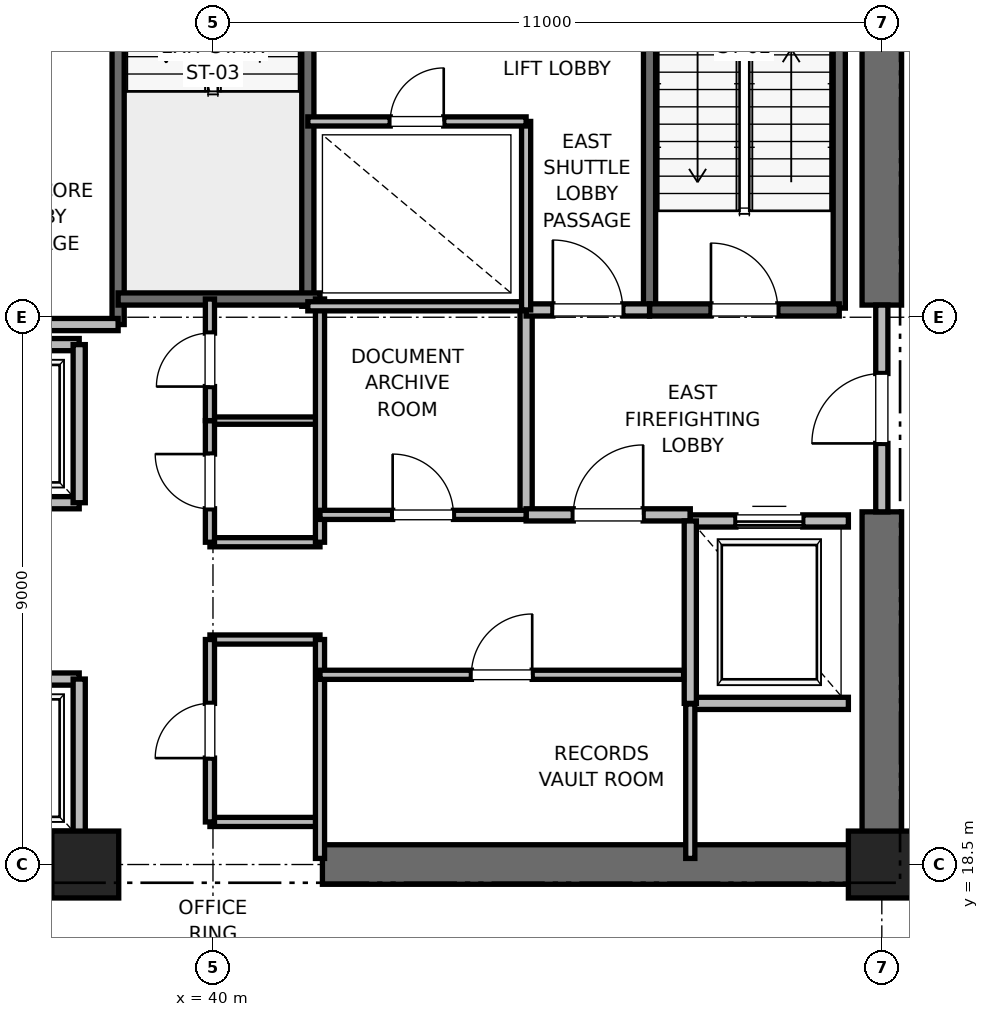
"""IFC4 building model, lengths in metres.
Left out: names, types, materials, properties, quantities, classifications, styles, units other than length and angle.
Written with IfcOpenShell. Run it as: python <this file> out.ifc"""

import sys

from ifc_helpers import new_model, si_unit, direction, frame, frame_2d, origin, origin_2d, place, context, subcontext, project, spatial, rectangle, extrude, element, fill, save


model = new_model("IFC4")
c1 = context("Model", 3, precision=1e-05, world=origin(), true_north=direction((0.0, 1.0)))
c2 = subcontext(c1, "Body", "Model", "MODEL_VIEW")
j1 = project(units=[si_unit("LENGTHUNIT", "METRE"), si_unit("PLANEANGLEUNIT", "RADIAN")], contexts=[c1])
p1 = place(None, origin())
s1 = spatial("IfcSite", under=j1, at=p1, CompositionType="ELEMENT")
p2 = place(p1, origin())
s2 = spatial("IfcBuilding", under=s1, at=p2, CompositionType="ELEMENT")
p3 = place(p2, frame((0.0, 0.0, 55.6)))
s3 = spatial("IfcBuildingStorey", under=s2, at=p3, CompositionType="ELEMENT", Elevation=55.6)
for number, where, z_axis, x_axis in (
    (1, (51.0, 18.5, 0.0), (0.0, 0.0, 1.0), (1.0, 0.0, 0.0)),
    (2, (37.9, 18.5, 0.0), (0.0, 0.0, 1.0), (1.0, 0.0, 0.0)),
):
    element("IfcColumn", number, at=place(p3, frame(where, z_axis=z_axis, x_axis=x_axis)), inside=s3, PredefinedType="PILASTER", context=c2, shape_type="SweptSolid", body=[
        extrude(rectangle(XDim=1.1, YDim=1.1, at=origin_2d()), origin(), (0.0, 0.0, 1.0), 4.0),
    ])
for number, where, z_axis, x_axis in (
    (3, (29.0, 18.5, 0.0), (0.0, 0.0, 1.0), (1.0, 0.0, 0.0)),
    (4, (41.8, 18.5, 0.0), (0.0, 0.0, 1.0), (1.0, 0.0, 0.0)),
):
    element("IfcWall", number, at=place(p3, frame(where, z_axis=z_axis, x_axis=x_axis)), inside=s3, PredefinedType="SHEAR", context=c2, shape_type="SweptSolid", body=[
        extrude(rectangle(XDim=9.2, YDim=0.65, at=frame_2d((4.6, 0.0))), origin(), (0.0, 0.0, 1.0), 3.76),
    ])
p4 = place(p3, frame((51.0, 18.5, 0.0), z_axis=(0.0, 0.0, 1.0), x_axis=(0.0, 1.0, 0.0)))
e5 = element("IfcWall", 5, at=p4, inside=s3, PredefinedType="SHEAR", context=c2, shape_type="SweptSolid", body=[
    extrude(rectangle(XDim=5.8, YDim=0.65, at=frame_2d((2.9, 0.0))), origin(), (0.0, 0.0, 1.0), 3.76),
])
p5 = place(p3, frame((51.0, 27.7, 0.0), z_axis=(0.0, 0.0, 1.0), x_axis=(0.0, 1.0, 0.0)))
e6 = element("IfcWall", 6, at=p5, inside=s3, PredefinedType="SHEAR", context=c2, shape_type="SweptSolid", body=[
    extrude(rectangle(XDim=8.8, YDim=0.65, at=frame_2d((4.4, 0.0))), origin(), (0.0, 0.0, 1.0), 3.76),
])
p6 = place(p3, frame((50.3, 27.65, 0.0), z_axis=(0.0, 0.0, 1.0), x_axis=(0.0, 1.0, 0.0)))
e7 = element("IfcWall", 7, at=p6, inside=s3, PredefinedType="SOLIDWALL", context=c2, shape_type="SweptSolid", body=[
    extrude(rectangle(XDim=8.15, YDim=0.2, at=frame_2d((4.075, 0.0))), origin(), (0.0, 0.0, 1.0), 3.76),
])
p7 = place(p3, frame((47.18, 27.62, 0.0), z_axis=(0.0, 0.0, 1.0), x_axis=(0.0, 1.0, 0.0)))
e8 = element("IfcWall", 8, at=p7, inside=s3, PredefinedType="SOLIDWALL", context=c2, shape_type="SweptSolid", body=[
    extrude(rectangle(XDim=8.18, YDim=0.2, at=frame_2d((4.09, 0.0))), origin(), (0.0, 0.0, 1.0), 3.76),
])
p8 = place(p3, frame((47.18, 27.62, 0.0), z_axis=(0.0, 0.0, 1.0), x_axis=(1.0, 0.0, 0.0)))
e9 = element("IfcWall", 9, at=p8, inside=s3, PredefinedType="SOLIDWALL", context=c2, shape_type="SweptSolid", body=[
    extrude(rectangle(XDim=3.12, YDim=0.2, at=frame_2d((1.56, 0.0))), origin(), (0.0, 0.0, 1.0), 3.76),
])
p9 = place(p8, frame((1.01, 0.0, 0.0)))
e10 = element("IfcOpeningElement", 10, at=p9, cuts=e9, PredefinedType="OPENING", context=c2, shape_type="SweptSolid", body=[
    extrude(rectangle(XDim=1.1, YDim=2.15, at=frame_2d((0.55, 1.075))), frame((0.0, 0.1, 0.0), z_axis=(0.0, -1.0, 0.0), x_axis=(1.0, 0.0, 0.0)), (0.0, 0.0, 1.0), 0.2),
])
p10 = place(p3, frame((38.44, 27.38, 0.0), z_axis=(0.0, 0.0, 1.0), x_axis=(0.0, 1.0, 0.0)))
e11 = element("IfcWall", 11, at=p10, inside=s3, PredefinedType="SOLIDWALL", context=c2, shape_type="SweptSolid", body=[
    extrude(rectangle(XDim=8.87, YDim=0.2, at=frame_2d((4.435, 0.0))), origin(), (0.0, 0.0, 1.0), 3.76),
])
p11 = place(p3, frame((41.56, 27.68, 0.0), z_axis=(0.0, 0.0, 1.0), x_axis=(0.0, 1.0, 0.0)))
e12 = element("IfcWall", 12, at=p11, inside=s3, PredefinedType="SOLIDWALL", context=c2, shape_type="SweptSolid", body=[
    extrude(rectangle(XDim=8.57, YDim=0.2, at=frame_2d((4.285, 0.0))), origin(), (0.0, 0.0, 1.0), 3.76),
])
p12 = place(p3, frame((38.44, 27.8, 0.0), z_axis=(0.0, 0.0, 1.0), x_axis=(1.0, 0.0, 0.0)))
e13 = element("IfcWall", 13, at=p12, inside=s3, PredefinedType="SOLIDWALL", context=c2, shape_type="SweptSolid", body=[
    extrude(rectangle(XDim=3.32, YDim=0.2, at=frame_2d((1.66, 0.0))), origin(), (0.0, 0.0, 1.0), 3.76),
])
p13 = place(p3, frame((32.82, 27.38, 0.0), z_axis=(0.0, 0.0, 1.0), x_axis=(1.0, 0.0, 0.0)))
e14 = element("IfcWall", 14, at=p13, inside=s3, PredefinedType="PARTITIONING", context=c2, shape_type="SweptSolid", body=[
    extrude(rectangle(XDim=5.62, YDim=0.2, at=frame_2d((2.81, 0.0))), origin(), (0.0, 0.0, 1.0), 3.76),
])
p14 = place(p3, frame((45.15, 24.25, 0.0), z_axis=(0.0, 0.0, 1.0), x_axis=(0.0, 1.0, 0.0)))
e15 = element("IfcWall", 15, at=p14, inside=s3, PredefinedType="PARTITIONING", context=c2, shape_type="SweptSolid", body=[
    extrude(rectangle(XDim=3.37, YDim=0.2, at=frame_2d((1.685, 0.0))), origin(), (0.0, 0.0, 1.0), 3.76),
])
p15 = place(p3, frame((45.15, 24.25, 0.0), z_axis=(0.0, 0.0, 1.0), x_axis=(1.0, 0.0, 0.0)))
e16 = element("IfcWall", 16, at=p15, inside=s3, PredefinedType="PARTITIONING", context=c2, shape_type="SweptSolid", body=[
    extrude(rectangle(XDim=2.7, YDim=0.2, at=frame_2d((1.35, 0.0))), origin(), (0.0, 0.0, 1.0), 3.76),
])
p16 = place(p15, frame((0.775, 0.0, 0.0)))
e17 = element("IfcOpeningElement", 17, at=p16, cuts=e16, PredefinedType="OPENING", context=c2, shape_type="SweptSolid", body=[
    extrude(rectangle(XDim=1.15, YDim=2.2, at=frame_2d((0.575, 1.1))), frame((0.0, 0.1, 0.0), z_axis=(0.0, -1.0, 0.0), x_axis=(1.0, 0.0, 0.0)), (0.0, 0.0, 1.0), 0.2),
])
p17 = place(p3, frame((45.15, 27.62, 0.0), z_axis=(0.0, 0.0, 1.0), x_axis=(1.0, 0.0, 0.0)))
e18 = element("IfcWall", 18, at=p17, inside=s3, PredefinedType="PARTITIONING", context=c2, shape_type="SweptSolid", body=[
    extrude(rectangle(XDim=2.03, YDim=0.2, at=frame_2d((1.015, 0.0))), origin(), (0.0, 0.0, 1.0), 3.76),
])
p18 = place(p17, frame((0.44, 0.0, 0.0)))
e19 = element("IfcOpeningElement", 19, at=p18, cuts=e18, PredefinedType="OPENING", context=c2, shape_type="SweptSolid", body=[
    extrude(rectangle(XDim=1.15, YDim=2.2, at=frame_2d((0.575, 1.1))), frame((0.0, 0.1, 0.0), z_axis=(0.0, -1.0, 0.0), x_axis=(1.0, 0.0, 0.0)), (0.0, 0.0, 1.0), 0.2),
])
p19 = place(p3, frame((51.0, 24.3, 0.0), z_axis=(0.0, 0.0, 1.0), x_axis=(0.0, 1.0, 0.0)))
e20 = element("IfcWall", 20, at=p19, inside=s3, PredefinedType="PARTITIONING", context=c2, shape_type="SweptSolid", body=[
    extrude(rectangle(XDim=3.4, YDim=0.2, at=frame_2d((1.7, 0.0))), origin(), (0.0, 0.0, 1.0), 2.54),
])
p20 = place(p19, frame((1.125, 0.0, 0.0)))
e21 = element("IfcOpeningElement", 21, at=p20, cuts=e20, PredefinedType="OPENING", context=c2, shape_type="SweptSolid", body=[
    extrude(rectangle(XDim=1.15, YDim=2.2, at=frame_2d((0.575, 1.1))), frame((0.0, 0.1, 0.0), z_axis=(0.0, -1.0, 0.0), x_axis=(1.0, 0.0, 0.0)), (0.0, 0.0, 1.0), 0.2),
])
p21 = place(p3, frame((47.85, 21.15, 0.0), z_axis=(0.0, 0.0, 1.0), x_axis=(1.0, 0.0, 0.0)))
e22 = element("IfcWall", 22, at=p21, inside=s3, PredefinedType="SOLIDWALL", context=c2, shape_type="SweptSolid", body=[
    extrude(rectangle(XDim=2.6, YDim=0.2, at=frame_2d((1.3, 0.0))), origin(), (0.0, 0.0, 1.0), 3.76),
])
p22 = place(p3, frame((50.45, 24.15, 0.0), z_axis=(0.0, 0.0, 1.0), x_axis=(-1.0, 0.0, 0.0)))
e23 = element("IfcWall", 23, at=p22, inside=s3, PredefinedType="SOLIDWALL", context=c2, shape_type="SweptSolid", body=[
    extrude(rectangle(XDim=2.6, YDim=0.2, at=frame_2d((1.3, 0.0))), origin(), (0.0, 0.0, 1.0), 2.54),
])
p23 = place(p22, frame((0.75, 0.0, 0.0)))
e24 = element("IfcOpeningElement", 24, at=p23, cuts=e23, PredefinedType="OPENING", context=c2, shape_type="SweptSolid", body=[
    extrude(rectangle(XDim=1.1, YDim=2.2, at=frame_2d((0.55, 1.1))), frame((0.0, 0.1, 0.0), z_axis=(0.0, -1.0, 0.0), x_axis=(1.0, 0.0, 0.0)), (0.0, 0.0, 1.0), 0.2),
])
p24 = place(p3, frame((47.85, 24.15, 0.0), z_axis=(0.0, 0.0, 1.0), x_axis=(0.0, -1.0, 0.0)))
e25 = element("IfcWall", 25, at=p24, inside=s3, PredefinedType="SOLIDWALL", context=c2, shape_type="SweptSolid", body=[
    extrude(rectangle(XDim=3.0, YDim=0.2, at=frame_2d((1.5, 0.0))), origin(), (0.0, 0.0, 1.0), 3.76),
])
p25 = place(p3, frame((35.5, 18.95, 0.0), z_axis=(0.0, 0.0, 1.0), x_axis=(1.0, 0.0, 0.0)))
e26 = element("IfcWall", 26, at=p25, inside=s3, PredefinedType="SOLIDWALL", context=c2, shape_type="SweptSolid", body=[
    extrude(rectangle(XDim=2.3, YDim=0.2, at=frame_2d((1.15, 0.0))), origin(), (0.0, 0.0, 1.0), 2.54),
])
p26 = place(p3, frame((37.8, 21.55, 0.0), z_axis=(0.0, 0.0, 1.0), x_axis=(-1.0, 0.0, 0.0)))
e27 = element("IfcWall", 27, at=p26, inside=s3, PredefinedType="SOLIDWALL", context=c2, shape_type="SweptSolid", body=[
    extrude(rectangle(XDim=2.3, YDim=0.2, at=frame_2d((1.15, 0.0))), origin(), (0.0, 0.0, 1.0), 3.76),
])
p27 = place(p26, frame((0.6, 0.0, 0.0)))
e28 = element("IfcOpeningElement", 28, at=p27, cuts=e27, PredefinedType="OPENING", context=c2, shape_type="SweptSolid", body=[
    extrude(rectangle(XDim=1.1, YDim=2.2, at=frame_2d((0.55, 1.1))), frame((0.0, 0.1, 0.0), z_axis=(0.0, -1.0, 0.0), x_axis=(1.0, 0.0, 0.0)), (0.0, 0.0, 1.0), 0.2),
])
p28 = place(p3, frame((37.8, 18.95, 0.0), z_axis=(0.0, 0.0, 1.0), x_axis=(0.0, 1.0, 0.0)))
e29 = element("IfcWall", 29, at=p28, inside=s3, PredefinedType="SOLIDWALL", context=c2, shape_type="SweptSolid", body=[
    extrude(rectangle(XDim=2.6, YDim=0.2, at=frame_2d((1.3, 0.0))), origin(), (0.0, 0.0, 1.0), 2.54),
])
p29 = place(p3, frame((35.5, 24.45, 0.0), z_axis=(0.0, 0.0, 1.0), x_axis=(1.0, 0.0, 0.0)))
e30 = element("IfcWall", 30, at=p29, inside=s3, PredefinedType="SOLIDWALL", context=c2, shape_type="SweptSolid", body=[
    extrude(rectangle(XDim=2.3, YDim=0.2, at=frame_2d((1.15, 0.0))), origin(), (0.0, 0.0, 1.0), 3.76),
])
p30 = place(p29, frame((0.6, 0.0, 0.0)))
e31 = element("IfcOpeningElement", 31, at=p30, cuts=e30, PredefinedType="OPENING", context=c2, shape_type="SweptSolid", body=[
    extrude(rectangle(XDim=1.1, YDim=2.2, at=frame_2d((0.55, 1.1))), frame((0.0, 0.1, 0.0), z_axis=(0.0, -1.0, 0.0), x_axis=(1.0, 0.0, 0.0)), (0.0, 0.0, 1.0), 0.2),
])
p31 = place(p3, frame((37.8, 27.05, 0.0), z_axis=(0.0, 0.0, 1.0), x_axis=(-1.0, 0.0, 0.0)))
e32 = element("IfcWall", 32, at=p31, inside=s3, PredefinedType="SOLIDWALL", context=c2, shape_type="SweptSolid", body=[
    extrude(rectangle(XDim=2.3, YDim=0.2, at=frame_2d((1.15, 0.0))), origin(), (0.0, 0.0, 1.0), 3.76),
])
p32 = place(p3, frame((37.8, 24.45, 0.0), z_axis=(0.0, 0.0, 1.0), x_axis=(0.0, 1.0, 0.0)))
e33 = element("IfcWall", 33, at=p32, inside=s3, PredefinedType="SOLIDWALL", context=c2, shape_type="SweptSolid", body=[
    extrude(rectangle(XDim=2.6, YDim=0.2, at=frame_2d((1.3, 0.0))), origin(), (0.0, 0.0, 1.0), 3.76),
])
for number, where, z_axis, x_axis in (
    (34, (39.95, 19.2, 0.0), (0.0, 0.0, 1.0), (1.0, 0.0, 0.0)),
    (35, (39.95, 22.2, 0.0), (0.0, 0.0, 1.0), (1.0, 0.0, 0.0)),
    (36, (39.95, 23.8, 0.0), (0.0, 0.0, 1.0), (1.0, 0.0, 0.0)),
):
    element("IfcWall", number, at=place(p3, frame(where, z_axis=z_axis, x_axis=x_axis)), inside=s3, PredefinedType="PARTITIONING", context=c2, shape_type="SweptSolid", body=[
        extrude(rectangle(XDim=1.81, YDim=0.15, at=frame_2d((0.905, 0.0))), origin(), (0.0, 0.0, 1.0), 2.85),
    ])
p33 = place(p3, frame((39.95, 25.8, 0.0), z_axis=(0.0, 0.0, 1.0), x_axis=(1.0, 0.0, 0.0)))
e37 = element("IfcWall", 37, at=p33, inside=s3, PredefinedType="PARTITIONING", context=c2, shape_type="SweptSolid", body=[
    extrude(rectangle(XDim=1.81, YDim=0.12, at=frame_2d((0.905, 0.0))), origin(), (0.0, 0.0, 1.0), 2.85),
])
p34 = place(p3, frame((41.76, 18.6, 0.0), z_axis=(0.0, 0.0, 1.0), x_axis=(0.0, 1.0, 0.0)))
e38 = element("IfcWall", 38, at=p34, inside=s3, PredefinedType="PARTITIONING", context=c2, shape_type="SweptSolid", body=[
    extrude(rectangle(XDim=3.6, YDim=0.15, at=frame_2d((1.8, 0.0))), origin(), (0.0, 0.0, 1.0), 2.54),
])
p35 = place(p3, frame((41.76, 23.8, 0.0), z_axis=(0.0, 0.0, 1.0), x_axis=(0.0, 1.0, 0.0)))
e39 = element("IfcWall", 39, at=p35, inside=s3, PredefinedType="PARTITIONING", context=c2, shape_type="SweptSolid", body=[
    extrude(rectangle(XDim=4.0, YDim=0.15, at=frame_2d((2.0, 0.0))), origin(), (0.0, 0.0, 1.0), 2.85),
])
p36 = place(p3, frame((39.95, 19.2, 0.0), z_axis=(0.0, 0.0, 1.0), x_axis=(0.0, 1.0, 0.0)))
e40 = element("IfcWall", 40, at=p36, inside=s3, PredefinedType="PARTITIONING", context=c2, shape_type="SweptSolid", body=[
    extrude(rectangle(XDim=3.0, YDim=0.15, at=frame_2d((1.5, 0.0))), origin(), (0.0, 0.0, 1.0), 2.85),
])
p37 = place(p36, frame((1.05, 0.0, 0.0)))
e41 = element("IfcOpeningElement", 41, at=p37, cuts=e40, PredefinedType="OPENING", context=c2, shape_type="SweptSolid", body=[
    extrude(rectangle(XDim=0.9, YDim=2.1, at=frame_2d((0.45, 1.05))), frame((0.0, 0.075, 0.0), z_axis=(0.0, -1.0, 0.0), x_axis=(1.0, 0.0, 0.0)), (0.0, 0.0, 1.0), 0.15),
])
p38 = place(p3, frame((39.95, 23.8, 0.0), z_axis=(0.0, 0.0, 1.0), x_axis=(0.0, 1.0, 0.0)))
e42 = element("IfcWall", 42, at=p38, inside=s3, PredefinedType="PARTITIONING", context=c2, shape_type="SweptSolid", body=[
    extrude(rectangle(XDim=2.0, YDim=0.15, at=frame_2d((1.0, 0.0))), origin(), (0.0, 0.0, 1.0), 2.85),
])
p39 = place(p38, frame((0.55, 0.0, 0.0)))
e43 = element("IfcOpeningElement", 43, at=p39, cuts=e42, PredefinedType="OPENING", context=c2, shape_type="SweptSolid", body=[
    extrude(rectangle(XDim=0.9, YDim=2.1, at=frame_2d((0.45, 1.05))), frame((0.0, 0.075, 0.0), z_axis=(0.0, -1.0, 0.0), x_axis=(1.0, 0.0, 0.0)), (0.0, 0.0, 1.0), 0.15),
])
p40 = place(p3, frame((39.95, 25.8, 0.0), z_axis=(0.0, 0.0, 1.0), x_axis=(0.0, 1.0, 0.0)))
e44 = element("IfcWall", 44, at=p40, inside=s3, PredefinedType="PARTITIONING", context=c2, shape_type="SweptSolid", body=[
    extrude(rectangle(XDim=2.0, YDim=0.15, at=frame_2d((1.0, 0.0))), origin(), (0.0, 0.0, 1.0), 2.85),
])
p41 = place(p40, frame((0.56, 0.0, 0.0)))
e45 = element("IfcOpeningElement", 45, at=p41, cuts=e44, PredefinedType="OPENING", context=c2, shape_type="SweptSolid", body=[
    extrude(rectangle(XDim=0.88, YDim=2.1, at=frame_2d((0.44, 1.05))), frame((0.0, 0.075, 0.0), z_axis=(0.0, -1.0, 0.0), x_axis=(1.0, 0.0, 0.0)), (0.0, 0.0, 1.0), 0.15),
])
p42 = place(p3, frame((41.56, 27.68, 0.0), z_axis=(0.0, 0.0, 1.0), x_axis=(1.0, 0.0, 0.0)))
e46 = element("IfcWall", 46, at=p42, inside=s3, PredefinedType="PARTITIONING", context=c2, shape_type="SweptSolid", body=[
    extrude(rectangle(XDim=3.59, YDim=0.15, at=frame_2d((1.795, 0.0))), origin(), (0.0, 0.0, 1.0), 2.85),
])
p43 = place(p3, frame((47.85, 18.6, 0.0), z_axis=(0.0, 0.0, 1.0), x_axis=(0.0, 1.0, 0.0)))
e47 = element("IfcWall", 47, at=p43, inside=s3, PredefinedType="PARTITIONING", context=c2, shape_type="SweptSolid", body=[
    extrude(rectangle(XDim=2.54, YDim=0.15, at=frame_2d((1.27, 0.0))), origin(), (0.0, 0.0, 1.0), 2.85),
])
p44 = place(p3, frame((41.76, 21.62, 0.0), z_axis=(0.0, 0.0, 1.0), x_axis=(1.0, 0.0, 0.0)))
e48 = element("IfcWall", 48, at=p44, inside=s3, PredefinedType="PARTITIONING", context=c2, shape_type="SweptSolid", body=[
    extrude(rectangle(XDim=5.98, YDim=0.15, at=frame_2d((2.99, 0.0))), origin(), (0.0, 0.0, 1.0), 2.85),
])
p45 = place(p44, frame((2.49, 0.0, 0.0)))
e49 = element("IfcOpeningElement", 49, at=p45, cuts=e48, PredefinedType="OPENING", context=c2, shape_type="SweptSolid", body=[
    extrude(rectangle(XDim=1.0, YDim=2.15, at=frame_2d((0.5, 1.075))), frame((0.0, 0.075, 0.0), z_axis=(0.0, -1.0, 0.0), x_axis=(1.0, 0.0, 0.0)), (0.0, 0.0, 1.0), 0.15),
])
p46 = place(p3, frame((41.76, 24.25, 0.0), z_axis=(0.0, 0.0, 1.0), x_axis=(1.0, 0.0, 0.0)))
e50 = element("IfcWall", 50, at=p46, inside=s3, PredefinedType="PARTITIONING", context=c2, shape_type="SweptSolid", body=[
    extrude(rectangle(XDim=3.39, YDim=0.15, at=frame_2d((1.695, 0.0))), origin(), (0.0, 0.0, 1.0), 2.85),
])
p47 = place(p46, frame((1.195, 0.0, 0.0)))
e51 = element("IfcOpeningElement", 51, at=p47, cuts=e50, PredefinedType="OPENING", context=c2, shape_type="SweptSolid", body=[
    extrude(rectangle(XDim=1.0, YDim=2.15, at=frame_2d((0.5, 1.075))), frame((0.0, 0.075, 0.0), z_axis=(0.0, -1.0, 0.0), x_axis=(1.0, 0.0, 0.0)), (0.0, 0.0, 1.0), 0.15),
])
p48 = place(p3, frame((45.15, 27.62, 0.0), z_axis=(0.0, 0.0, 1.0), x_axis=(0.0, 1.0, 0.0)))
e52 = element("IfcWall", 52, at=p48, inside=s3, PredefinedType="PARTITIONING", context=c2, shape_type="SweptSolid", body=[
    extrude(rectangle(XDim=3.1, YDim=0.15, at=frame_2d((1.55, 0.0))), origin(), (0.0, 0.0, 1.0), 2.85),
])
p49 = place(p3, frame((41.56, 30.72, 0.0), z_axis=(0.0, 0.0, 1.0), x_axis=(1.0, 0.0, 0.0)))
e53 = element("IfcWall", 53, at=p49, inside=s3, PredefinedType="PARTITIONING", context=c2, shape_type="SweptSolid", body=[
    extrude(rectangle(XDim=3.59, YDim=0.15, at=frame_2d((1.795, 0.0))), origin(), (0.0, 0.0, 1.0), 2.85),
])
p50 = place(p49, frame((1.355, 0.0, 0.0)))
e54 = element("IfcOpeningElement", 54, at=p50, cuts=e53, PredefinedType="OPENING", context=c2, shape_type="SweptSolid", body=[
    extrude(rectangle(XDim=0.88, YDim=2.1, at=frame_2d((0.44, 1.05))), frame((0.0, 0.075, 0.0), z_axis=(0.0, -1.0, 0.0), x_axis=(1.0, 0.0, 0.0)), (0.0, 0.0, 1.0), 0.15),
])
p51 = place(p9, origin())
e55 = element("IfcDoor", 55, at=p51, inside=s3, OperationType="SINGLE_SWING_LEFT", PredefinedType="DOOR", context=c2, shape_type="SweptSolid", body=[
    extrude(rectangle(XDim=1.1, YDim=2.15, at=frame_2d((0.55, 1.075))), frame((0.0, 0.025, 0.0), z_axis=(0.0, -1.0, 0.0), x_axis=(1.0, 0.0, 0.0)), (0.0, 0.0, 1.0), 0.05),
])
fill(e10, e55)
p52 = place(p16, origin())
e56 = element("IfcDoor", 56, at=p52, inside=s3, OperationType="SINGLE_SWING_RIGHT", PredefinedType="DOOR", context=c2, shape_type="SweptSolid", body=[
    extrude(rectangle(XDim=1.15, YDim=2.2, at=frame_2d((0.575, 1.1))), frame((0.0, 0.025, 0.0), z_axis=(0.0, -1.0, 0.0), x_axis=(1.0, 0.0, 0.0)), (0.0, 0.0, 1.0), 0.05),
])
fill(e17, e56)
p53 = place(p18, origin())
e57 = element("IfcDoor", 57, at=p53, inside=s3, OperationType="SINGLE_SWING_LEFT", PredefinedType="DOOR", context=c2, shape_type="SweptSolid", body=[
    extrude(rectangle(XDim=1.15, YDim=2.2, at=frame_2d((0.575, 1.1))), frame((0.0, 0.025, 0.0), z_axis=(0.0, -1.0, 0.0), x_axis=(1.0, 0.0, 0.0)), (0.0, 0.0, 1.0), 0.05),
])
fill(e19, e57)
p54 = place(p20, origin())
e58 = element("IfcDoor", 58, at=p54, inside=s3, OperationType="SINGLE_SWING_LEFT", PredefinedType="DOOR", context=c2, shape_type="SweptSolid", body=[
    extrude(rectangle(XDim=1.15, YDim=2.2, at=frame_2d((0.575, 1.1))), frame((0.0, 0.025, 0.0), z_axis=(0.0, -1.0, 0.0), x_axis=(1.0, 0.0, 0.0)), (0.0, 0.0, 1.0), 0.05),
])
fill(e21, e58)
p55 = place(p23, origin())
e59 = element("IfcDoor", 59, at=p55, inside=s3, OperationType="SLIDING_TO_RIGHT", PredefinedType="DOOR", context=c2, shape_type="SweptSolid", body=[
    extrude(rectangle(XDim=1.1, YDim=2.2, at=frame_2d((0.55, 1.1))), frame((0.0, 0.025, 0.0), z_axis=(0.0, -1.0, 0.0), x_axis=(1.0, 0.0, 0.0)), (0.0, 0.0, 1.0), 0.05),
])
fill(e24, e59)
p56 = place(p37, origin())
e60 = element("IfcDoor", 60, at=p56, inside=s3, OperationType="SINGLE_SWING_LEFT", PredefinedType="DOOR", context=c2, shape_type="SweptSolid", body=[
    extrude(rectangle(XDim=0.9, YDim=2.1, at=frame_2d((0.45, 1.05))), frame((0.0, 0.025, 0.0), z_axis=(0.0, -1.0, 0.0), x_axis=(1.0, 0.0, 0.0)), (0.0, 0.0, 1.0), 0.05),
])
fill(e41, e60)
p57 = place(p39, origin())
e61 = element("IfcDoor", 61, at=p57, inside=s3, OperationType="SINGLE_SWING_RIGHT", PredefinedType="DOOR", context=c2, shape_type="SweptSolid", body=[
    extrude(rectangle(XDim=0.9, YDim=2.1, at=frame_2d((0.45, 1.05))), frame((0.0, 0.025, 0.0), z_axis=(0.0, -1.0, 0.0), x_axis=(1.0, 0.0, 0.0)), (0.0, 0.0, 1.0), 0.05),
])
fill(e43, e61)
p58 = place(p41, origin())
e62 = element("IfcDoor", 62, at=p58, inside=s3, OperationType="SINGLE_SWING_LEFT", PredefinedType="DOOR", context=c2, shape_type="SweptSolid", body=[
    extrude(rectangle(XDim=0.88, YDim=2.1, at=frame_2d((0.44, 1.05))), frame((0.0, 0.025, 0.0), z_axis=(0.0, -1.0, 0.0), x_axis=(1.0, 0.0, 0.0)), (0.0, 0.0, 1.0), 0.05),
])
fill(e45, e62)
p59 = place(p45, origin())
e63 = element("IfcDoor", 63, at=p59, inside=s3, OperationType="SINGLE_SWING_RIGHT", PredefinedType="DOOR", context=c2, shape_type="SweptSolid", body=[
    extrude(rectangle(XDim=1.0, YDim=2.15, at=frame_2d((0.5, 1.075))), frame((0.0, 0.025, 0.0), z_axis=(0.0, -1.0, 0.0), x_axis=(1.0, 0.0, 0.0)), (0.0, 0.0, 1.0), 0.05),
])
fill(e49, e63)
p60 = place(p47, origin())
e64 = element("IfcDoor", 64, at=p60, inside=s3, OperationType="SINGLE_SWING_LEFT", PredefinedType="DOOR", context=c2, shape_type="SweptSolid", body=[
    extrude(rectangle(XDim=1.0, YDim=2.15, at=frame_2d((0.5, 1.075))), frame((0.0, 0.025, 0.0), z_axis=(0.0, -1.0, 0.0), x_axis=(1.0, 0.0, 0.0)), (0.0, 0.0, 1.0), 0.05),
])
fill(e51, e64)
p61 = place(p50, origin())
e65 = element("IfcDoor", 65, at=p61, inside=s3, OperationType="SINGLE_SWING_RIGHT", PredefinedType="DOOR", context=c2, shape_type="SweptSolid", body=[
    extrude(rectangle(XDim=0.88, YDim=2.1, at=frame_2d((0.44, 1.05))), frame((0.0, 0.025, 0.0), z_axis=(0.0, -1.0, 0.0), x_axis=(1.0, 0.0, 0.0)), (0.0, 0.0, 1.0), 0.05),
])
fill(e54, e65)
save(model, sys.argv[1])
